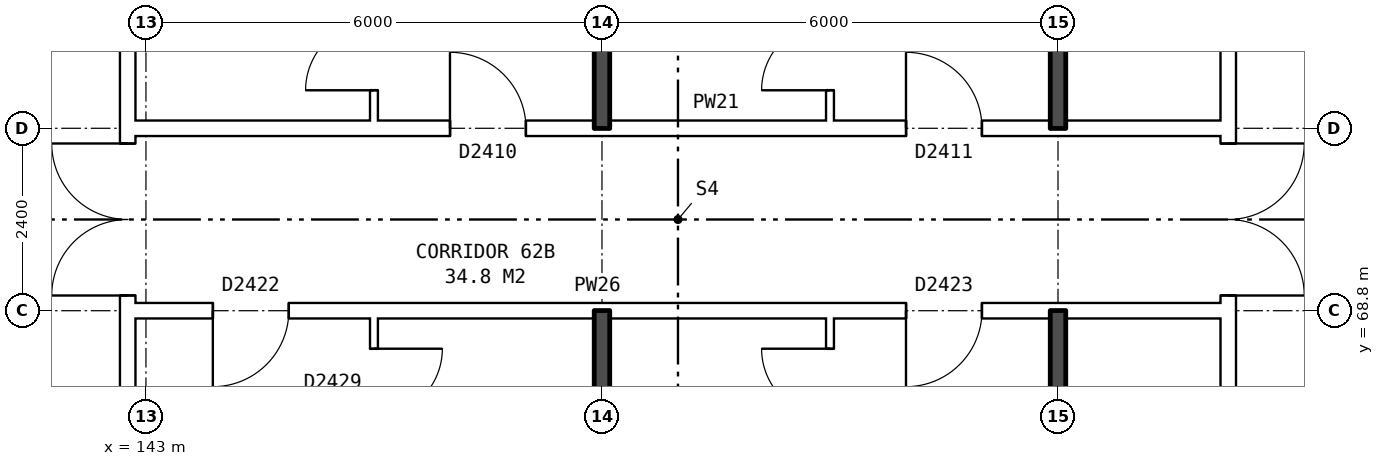
"""IFC4 building model, lengths in metres.
Left out: names, types, materials, properties, quantities, classifications, styles, units other than length and angle.
Written with IfcOpenShell. Run it as: python <this file> out.ifc"""

import sys

from ifc_helpers import new_model, si_unit, direction, frame, frame_2d, origin, place, context, subcontext, project, spatial, rectangle, extrude, element, fill, save


model = new_model("IFC4")
c1 = context("Model", 3, precision=1e-05, world=origin(), true_north=direction((0.0, 1.0)))
c2 = subcontext(c1, "Body", "Model", "MODEL_VIEW")
j1 = project(units=[si_unit("LENGTHUNIT", "METRE"), si_unit("PLANEANGLEUNIT", "RADIAN")], contexts=[c1])
p1 = place(None, origin())
s1 = spatial("IfcSite", under=j1, at=p1, CompositionType="ELEMENT")
p2 = place(p1, origin())
s2 = spatial("IfcBuilding", under=s1, at=p2, CompositionType="ELEMENT")
p3 = place(p2, frame((0.0, 0.0, 221.4)))
s3 = spatial("IfcBuildingStorey", under=s2, at=p3, CompositionType="ELEMENT", Elevation=221.4)
p4 = place(p3, frame((142.76, 63.9, 0.0), z_axis=(0.0, 0.0, 1.0), x_axis=(0.0, 1.0, 0.0)))
e1 = element("IfcWall", 1, at=p4, inside=s3, PredefinedType="PARTITIONING", context=c2, shape_type="SweptSolid", body=[
    extrude(rectangle(XDim=12.2, YDim=0.2, at=frame_2d((6.1, 0.0))), origin(), (0.0, 0.0, 1.0), 2.85),
])
p5 = place(p4, frame((5.1, 0.0, 0.0)))
e2 = element("IfcOpeningElement", 2, at=p5, cuts=e1, PredefinedType="OPENING", context=c2, shape_type="SweptSolid", body=[
    extrude(rectangle(XDim=2.0, YDim=2.1, at=frame_2d((1.0, 1.05))), frame((0.0, 0.11, 0.0), z_axis=(0.0, -1.0, 0.0), x_axis=(1.0, 0.0, 0.0)), (0.0, 0.0, 1.0), 0.22),
])
p6 = place(p3, frame((157.24, 63.9, 0.0), z_axis=(0.0, 0.0, 1.0), x_axis=(0.0, 1.0, 0.0)))
e3 = element("IfcWall", 3, at=p6, inside=s3, PredefinedType="PARTITIONING", context=c2, shape_type="SweptSolid", body=[
    extrude(rectangle(XDim=12.2, YDim=0.2, at=frame_2d((6.1, 0.0))), origin(), (0.0, 0.0, 1.0), 2.85),
])
p7 = place(p6, frame((5.1, 0.0, 0.0)))
e4 = element("IfcOpeningElement", 4, at=p7, cuts=e3, PredefinedType="OPENING", context=c2, shape_type="SweptSolid", body=[
    extrude(rectangle(XDim=2.0, YDim=2.1, at=frame_2d((1.0, 1.05))), frame((0.0, 0.11, 0.0), z_axis=(0.0, -1.0, 0.0), x_axis=(1.0, 0.0, 0.0)), (0.0, 0.0, 1.0), 0.22),
])
p8 = place(p3, frame((142.76, 68.8, 0.0), z_axis=(0.0, 0.0, 1.0), x_axis=(1.0, 0.0, 0.0)))
e5 = element("IfcWall", 5, at=p8, inside=s3, PredefinedType="PARTITIONING", context=c2, shape_type="SweptSolid", body=[
    extrude(rectangle(XDim=14.48, YDim=0.2, at=frame_2d((7.24, 0.0))), origin(), (0.0, 0.0, 1.0), 2.85),
])
p9 = place(p8, frame((1.12, 0.0, 0.0)))
e6 = element("IfcOpeningElement", 6, at=p9, cuts=e5, PredefinedType="OPENING", context=c2, shape_type="SweptSolid", body=[
    extrude(rectangle(XDim=1.0, YDim=2.1, at=frame_2d((0.5, 1.05))), frame((0.0, 0.11, 0.0), z_axis=(0.0, -1.0, 0.0), x_axis=(1.0, 0.0, 0.0)), (0.0, 0.0, 1.0), 0.22),
])
p10 = place(p8, frame((10.24, 0.0, 0.0)))
e7 = element("IfcOpeningElement", 7, at=p10, cuts=e5, PredefinedType="OPENING", context=c2, shape_type="SweptSolid", body=[
    extrude(rectangle(XDim=1.0, YDim=2.1, at=frame_2d((0.5, 1.05))), frame((0.0, 0.11, 0.0), z_axis=(0.0, -1.0, 0.0), x_axis=(1.0, 0.0, 0.0)), (0.0, 0.0, 1.0), 0.22),
])
p11 = place(p3, frame((142.76, 71.2, 0.0), z_axis=(0.0, 0.0, 1.0), x_axis=(1.0, 0.0, 0.0)))
e8 = element("IfcWall", 8, at=p11, inside=s3, PredefinedType="PARTITIONING", context=c2, shape_type="SweptSolid", body=[
    extrude(rectangle(XDim=14.48, YDim=0.2, at=frame_2d((7.24, 0.0))), origin(), (0.0, 0.0, 1.0), 2.85),
])
p12 = place(p11, frame((4.24, 0.0, 0.0)))
e9 = element("IfcOpeningElement", 9, at=p12, cuts=e8, PredefinedType="OPENING", context=c2, shape_type="SweptSolid", body=[
    extrude(rectangle(XDim=1.0, YDim=2.1, at=frame_2d((0.5, 1.05))), frame((0.0, 0.11, 0.0), z_axis=(0.0, -1.0, 0.0), x_axis=(1.0, 0.0, 0.0)), (0.0, 0.0, 1.0), 0.22),
])
p13 = place(p11, frame((10.24, 0.0, 0.0)))
e10 = element("IfcOpeningElement", 10, at=p13, cuts=e8, PredefinedType="OPENING", context=c2, shape_type="SweptSolid", body=[
    extrude(rectangle(XDim=1.0, YDim=2.1, at=frame_2d((0.5, 1.05))), frame((0.0, 0.11, 0.0), z_axis=(0.0, -1.0, 0.0), x_axis=(1.0, 0.0, 0.0)), (0.0, 0.0, 1.0), 0.22),
])
p14 = place(p3, frame((146.0, 54.36, 0.0), z_axis=(0.0, 0.0, 1.0), x_axis=(0.0, 1.0, 0.0)))
e11 = element("IfcWall", 11, at=p14, inside=s3, PredefinedType="PARTITIONING", context=c2, shape_type="SweptSolid", body=[
    extrude(rectangle(XDim=14.34, YDim=0.1, at=frame_2d((7.17, 0.0))), origin(), (0.0, 0.0, 1.0), 2.85),
])
p15 = place(p14, frame((7.7, 0.0, 0.0)))
e12 = element("IfcOpeningElement", 12, at=p15, cuts=e11, PredefinedType="OPENING", context=c2, shape_type="SweptSolid", body=[
    extrude(rectangle(XDim=0.9, YDim=2.1, at=frame_2d((0.45, 1.05))), frame((0.0, 0.06, 0.0), z_axis=(0.0, -1.0, 0.0), x_axis=(1.0, 0.0, 0.0)), (0.0, 0.0, 1.0), 0.12),
])
p16 = place(p14, frame((13.04, 0.0, 0.0)))
e13 = element("IfcOpeningElement", 13, at=p16, cuts=e11, PredefinedType="OPENING", context=c2, shape_type="SweptSolid", body=[
    extrude(rectangle(XDim=0.9, YDim=2.1, at=frame_2d((0.45, 1.05))), frame((0.0, 0.06, 0.0), z_axis=(0.0, -1.0, 0.0), x_axis=(1.0, 0.0, 0.0)), (0.0, 0.0, 1.0), 0.12),
])
p17 = place(p3, frame((146.0, 71.3, 0.0), z_axis=(0.0, 0.0, 1.0), x_axis=(0.0, 1.0, 0.0)))
e14 = element("IfcWall", 14, at=p17, inside=s3, PredefinedType="PARTITIONING", context=c2, shape_type="SweptSolid", body=[
    extrude(rectangle(XDim=14.34, YDim=0.1, at=frame_2d((7.17, 0.0))), origin(), (0.0, 0.0, 1.0), 2.85),
])
p18 = place(p17, frame((5.74, 0.0, 0.0)))
e15 = element("IfcOpeningElement", 15, at=p18, cuts=e14, PredefinedType="OPENING", context=c2, shape_type="SweptSolid", body=[
    extrude(rectangle(XDim=0.9, YDim=2.1, at=frame_2d((0.45, 1.05))), frame((0.0, 0.06, 0.0), z_axis=(0.0, -1.0, 0.0), x_axis=(1.0, 0.0, 0.0)), (0.0, 0.0, 1.0), 0.12),
])
p19 = place(p17, frame((0.4, 0.0, 0.0)))
e16 = element("IfcOpeningElement", 16, at=p19, cuts=e14, PredefinedType="OPENING", context=c2, shape_type="SweptSolid", body=[
    extrude(rectangle(XDim=0.9, YDim=2.1, at=frame_2d((0.45, 1.05))), frame((0.0, 0.06, 0.0), z_axis=(0.0, -1.0, 0.0), x_axis=(1.0, 0.0, 0.0)), (0.0, 0.0, 1.0), 0.12),
])
for number, where, z_axis, x_axis in (
    (17, (149.0, 54.36, 0.0), (0.0, 0.0, 1.0), (0.0, 1.0, 0.0)),
    (18, (149.0, 71.2, 0.0), (0.0, 0.0, 1.0), (0.0, 1.0, 0.0)),
):
    element("IfcWall", number, at=place(p3, frame(where, z_axis=z_axis, x_axis=x_axis)), inside=s3, PredefinedType="SOLIDWALL", context=c2, shape_type="SweptSolid", body=[
        extrude(rectangle(XDim=14.44, YDim=0.2, at=frame_2d((7.22, 0.0))), origin(), (0.0, 0.0, 1.0), 2.85),
    ])
p20 = place(p3, frame((152.0, 54.36, 0.0), z_axis=(0.0, 0.0, 1.0), x_axis=(0.0, 1.0, 0.0)))
e19 = element("IfcWall", 19, at=p20, inside=s3, PredefinedType="PARTITIONING", context=c2, shape_type="SweptSolid", body=[
    extrude(rectangle(XDim=14.34, YDim=0.1, at=frame_2d((7.17, 0.0))), origin(), (0.0, 0.0, 1.0), 2.85),
])
p21 = place(p20, frame((5.5, 0.0, 0.0)))
e20 = element("IfcOpeningElement", 20, at=p21, cuts=e19, PredefinedType="OPENING", context=c2, shape_type="SweptSolid", body=[
    extrude(rectangle(XDim=0.9, YDim=2.1, at=frame_2d((0.45, 1.05))), frame((0.0, 0.06, 0.0), z_axis=(0.0, -1.0, 0.0), x_axis=(1.0, 0.0, 0.0)), (0.0, 0.0, 1.0), 0.12),
])
p22 = place(p20, frame((13.04, 0.0, 0.0)))
e21 = element("IfcOpeningElement", 21, at=p22, cuts=e19, PredefinedType="OPENING", context=c2, shape_type="SweptSolid", body=[
    extrude(rectangle(XDim=0.9, YDim=2.1, at=frame_2d((0.45, 1.05))), frame((0.0, 0.06, 0.0), z_axis=(0.0, -1.0, 0.0), x_axis=(1.0, 0.0, 0.0)), (0.0, 0.0, 1.0), 0.12),
])
p23 = place(p3, frame((152.0, 71.3, 0.0), z_axis=(0.0, 0.0, 1.0), x_axis=(0.0, 1.0, 0.0)))
e22 = element("IfcWall", 22, at=p23, inside=s3, PredefinedType="PARTITIONING", context=c2, shape_type="SweptSolid", body=[
    extrude(rectangle(XDim=14.34, YDim=0.1, at=frame_2d((7.17, 0.0))), origin(), (0.0, 0.0, 1.0), 2.85),
])
p24 = place(p23, frame((6.74, 0.0, 0.0)))
e23 = element("IfcOpeningElement", 23, at=p24, cuts=e22, PredefinedType="OPENING", context=c2, shape_type="SweptSolid", body=[
    extrude(rectangle(XDim=0.9, YDim=2.1, at=frame_2d((0.45, 1.05))), frame((0.0, 0.06, 0.0), z_axis=(0.0, -1.0, 0.0), x_axis=(1.0, 0.0, 0.0)), (0.0, 0.0, 1.0), 0.12),
])
p25 = place(p23, frame((0.4, 0.0, 0.0)))
e24 = element("IfcOpeningElement", 24, at=p25, cuts=e22, PredefinedType="OPENING", context=c2, shape_type="SweptSolid", body=[
    extrude(rectangle(XDim=0.9, YDim=2.1, at=frame_2d((0.45, 1.05))), frame((0.0, 0.06, 0.0), z_axis=(0.0, -1.0, 0.0), x_axis=(1.0, 0.0, 0.0)), (0.0, 0.0, 1.0), 0.12),
])
for number, where, z_axis, x_axis in (
    (25, (155.0, 54.36, 0.0), (0.0, 0.0, 1.0), (0.0, 1.0, 0.0)),
    (26, (155.0, 71.2, 0.0), (0.0, 0.0, 1.0), (0.0, 1.0, 0.0)),
):
    element("IfcWall", number, at=place(p3, frame(where, z_axis=z_axis, x_axis=x_axis)), inside=s3, PredefinedType="SOLIDWALL", context=c2, shape_type="SweptSolid", body=[
        extrude(rectangle(XDim=14.44, YDim=0.2, at=frame_2d((7.22, 0.0))), origin(), (0.0, 0.0, 1.0), 2.85),
    ])
p26 = place(p5, origin())
e27 = element("IfcDoor", 27, at=p26, inside=s3, OperationType="DOUBLE_DOOR_SINGLE_SWING", PredefinedType="DOOR", context=c2, shape_type="SweptSolid", body=[
    extrude(rectangle(XDim=2.0, YDim=2.1, at=frame_2d((1.0, 1.05))), frame((0.0, 0.025, 0.0), z_axis=(0.0, -1.0, 0.0), x_axis=(1.0, 0.0, 0.0)), (0.0, 0.0, 1.0), 0.05),
])
fill(e2, e27)
p27 = place(p7, frame((2.0, 0.0, 0.0), z_axis=(0.0, 0.0, 1.0), x_axis=(-1.0, 0.0, 0.0)))
e28 = element("IfcDoor", 28, at=p27, inside=s3, OperationType="DOUBLE_DOOR_SINGLE_SWING", PredefinedType="DOOR", context=c2, shape_type="SweptSolid", body=[
    extrude(rectangle(XDim=2.0, YDim=2.1, at=frame_2d((1.0, 1.05))), frame((0.0, 0.025, 0.0), z_axis=(0.0, -1.0, 0.0), x_axis=(1.0, 0.0, 0.0)), (0.0, 0.0, 1.0), 0.05),
])
fill(e4, e28)
p28 = place(p9, frame((1.0, 0.0, 0.0), z_axis=(0.0, 0.0, 1.0), x_axis=(-1.0, 0.0, 0.0)))
e29 = element("IfcDoor", 29, at=p28, inside=s3, OperationType="SINGLE_SWING_RIGHT", PredefinedType="DOOR", context=c2, shape_type="SweptSolid", body=[
    extrude(rectangle(XDim=1.0, YDim=2.1, at=frame_2d((0.5, 1.05))), frame((0.0, 0.025, 0.0), z_axis=(0.0, -1.0, 0.0), x_axis=(1.0, 0.0, 0.0)), (0.0, 0.0, 1.0), 0.05),
])
fill(e6, e29)
p29 = place(p16, frame((0.9, 0.0, 0.0), z_axis=(0.0, 0.0, 1.0), x_axis=(-1.0, 0.0, 0.0)))
e30 = element("IfcDoor", 30, at=p29, inside=s3, OperationType="SINGLE_SWING_LEFT", PredefinedType="DOOR", context=c2, shape_type="SweptSolid", body=[
    extrude(rectangle(XDim=0.9, YDim=2.1, at=frame_2d((0.45, 1.05))), frame((0.0, 0.025, 0.0), z_axis=(0.0, -1.0, 0.0), x_axis=(1.0, 0.0, 0.0)), (0.0, 0.0, 1.0), 0.05),
])
fill(e13, e30)
p30 = place(p10, frame((1.0, 0.0, 0.0), z_axis=(0.0, 0.0, 1.0), x_axis=(-1.0, 0.0, 0.0)))
e31 = element("IfcDoor", 31, at=p30, inside=s3, OperationType="SINGLE_SWING_RIGHT", PredefinedType="DOOR", context=c2, shape_type="SweptSolid", body=[
    extrude(rectangle(XDim=1.0, YDim=2.1, at=frame_2d((0.5, 1.05))), frame((0.0, 0.025, 0.0), z_axis=(0.0, -1.0, 0.0), x_axis=(1.0, 0.0, 0.0)), (0.0, 0.0, 1.0), 0.05),
])
fill(e7, e31)
p31 = place(p22, origin())
e32 = element("IfcDoor", 32, at=p31, inside=s3, OperationType="SINGLE_SWING_RIGHT", PredefinedType="DOOR", context=c2, shape_type="SweptSolid", body=[
    extrude(rectangle(XDim=0.9, YDim=2.1, at=frame_2d((0.45, 1.05))), frame((0.0, 0.025, 0.0), z_axis=(0.0, -1.0, 0.0), x_axis=(1.0, 0.0, 0.0)), (0.0, 0.0, 1.0), 0.05),
])
fill(e21, e32)
p32 = place(p12, origin())
e33 = element("IfcDoor", 33, at=p32, inside=s3, OperationType="SINGLE_SWING_LEFT", PredefinedType="DOOR", context=c2, shape_type="SweptSolid", body=[
    extrude(rectangle(XDim=1.0, YDim=2.1, at=frame_2d((0.5, 1.05))), frame((0.0, 0.025, 0.0), z_axis=(0.0, -1.0, 0.0), x_axis=(1.0, 0.0, 0.0)), (0.0, 0.0, 1.0), 0.05),
])
fill(e9, e33)
p33 = place(p19, origin())
e34 = element("IfcDoor", 34, at=p33, inside=s3, OperationType="SINGLE_SWING_LEFT", PredefinedType="DOOR", context=c2, shape_type="SweptSolid", body=[
    extrude(rectangle(XDim=0.9, YDim=2.1, at=frame_2d((0.45, 1.05))), frame((0.0, 0.025, 0.0), z_axis=(0.0, -1.0, 0.0), x_axis=(1.0, 0.0, 0.0)), (0.0, 0.0, 1.0), 0.05),
])
fill(e16, e34)
p34 = place(p13, origin())
e35 = element("IfcDoor", 35, at=p34, inside=s3, OperationType="SINGLE_SWING_LEFT", PredefinedType="DOOR", context=c2, shape_type="SweptSolid", body=[
    extrude(rectangle(XDim=1.0, YDim=2.1, at=frame_2d((0.5, 1.05))), frame((0.0, 0.025, 0.0), z_axis=(0.0, -1.0, 0.0), x_axis=(1.0, 0.0, 0.0)), (0.0, 0.0, 1.0), 0.05),
])
fill(e10, e35)
p35 = place(p25, origin())
e36 = element("IfcDoor", 36, at=p35, inside=s3, OperationType="SINGLE_SWING_LEFT", PredefinedType="DOOR", context=c2, shape_type="SweptSolid", body=[
    extrude(rectangle(XDim=0.9, YDim=2.1, at=frame_2d((0.45, 1.05))), frame((0.0, 0.025, 0.0), z_axis=(0.0, -1.0, 0.0), x_axis=(1.0, 0.0, 0.0)), (0.0, 0.0, 1.0), 0.05),
])
fill(e24, e36)
save(model, sys.argv[1])
